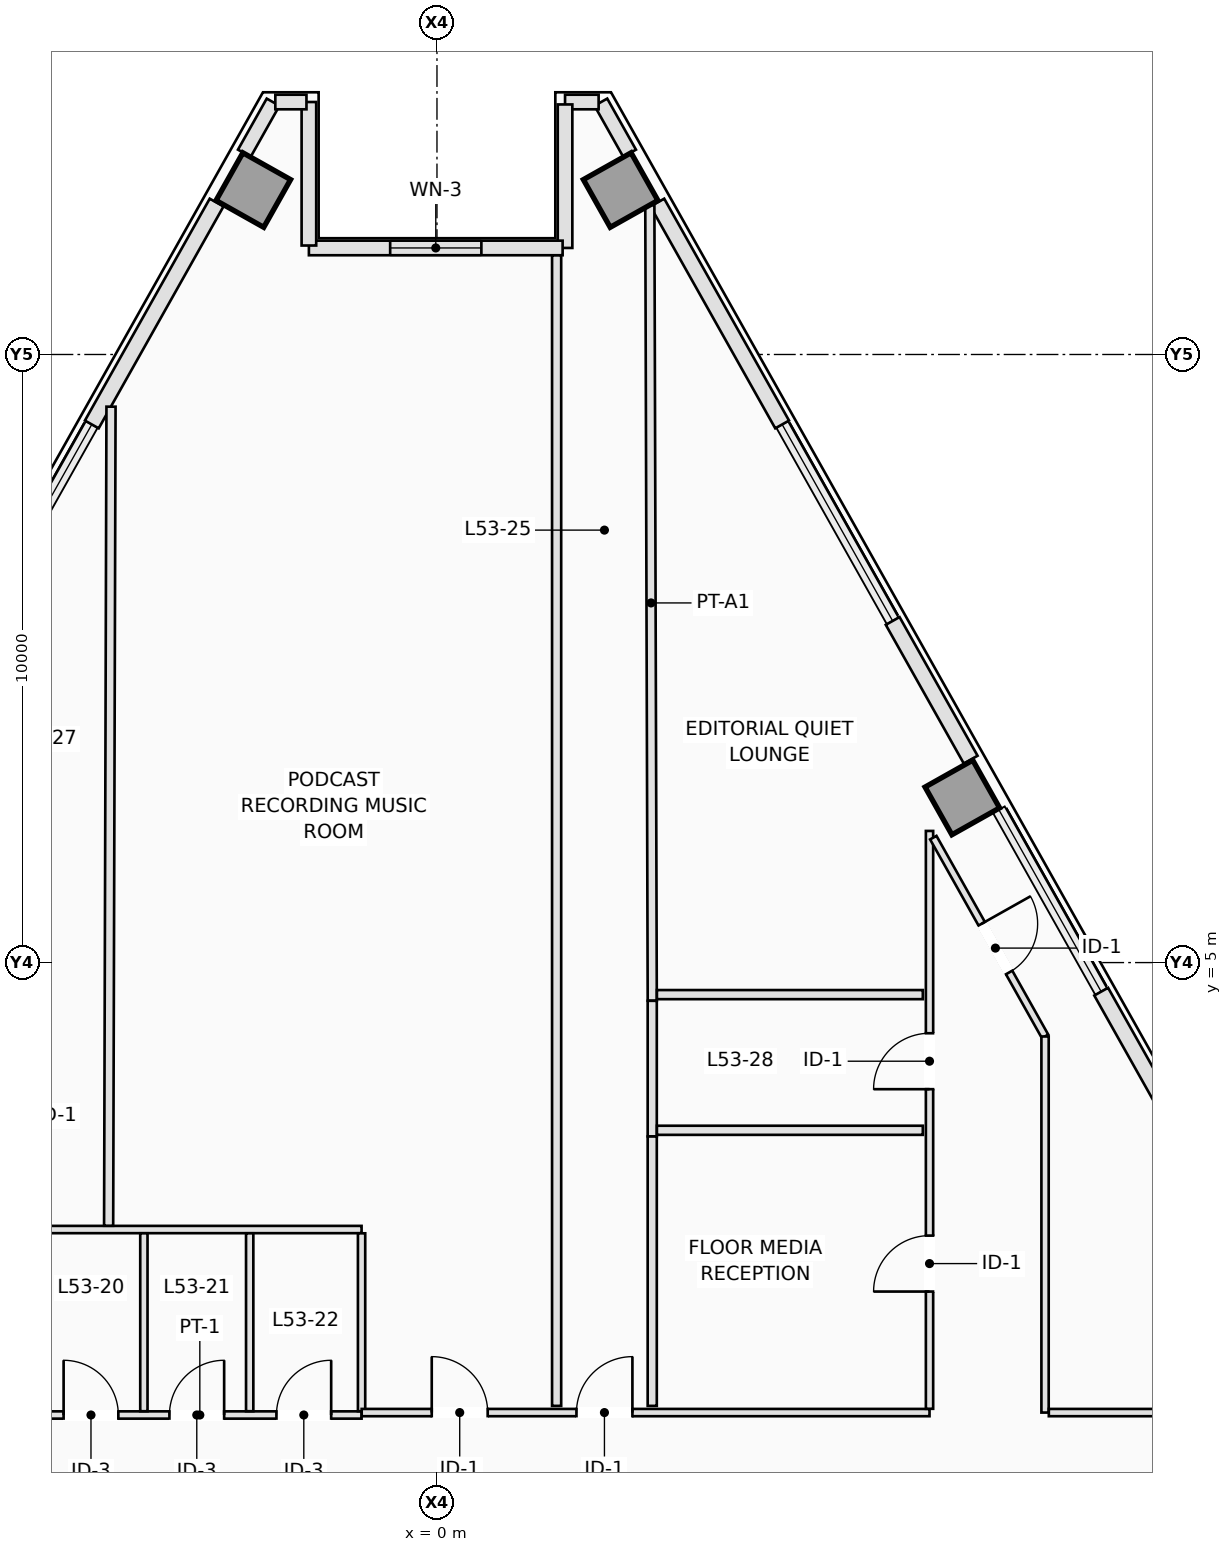
"""IFC4 building model, lengths in metres.
Left out: names, types, materials, properties, quantities, classifications, styles, units other than length and angle.
Written with IfcOpenShell. Run it as: python <this file> out.ifc"""

import sys

from ifc_helpers import new_model, si_unit, direction, frame, frame_2d, origin, origin_2d, place, context, subcontext, project, spatial, rectangle, extrude, element, fill, save


model = new_model("IFC4")
c1 = context("Model", 3, precision=1e-05, world=origin(), true_north=direction((0.0, 1.0)))
c2 = subcontext(c1, "Body", "Model", "MODEL_VIEW")
j1 = project(units=[si_unit("LENGTHUNIT", "METRE"), si_unit("PLANEANGLEUNIT", "RADIAN")], contexts=[c1])
p1 = place(None, origin())
s1 = spatial("IfcSite", under=j1, at=p1, CompositionType="ELEMENT")
p2 = place(p1, origin())
s2 = spatial("IfcBuilding", under=s1, at=p2, CompositionType="ELEMENT")
p3 = place(p2, frame((0.0, 0.0, 193.9)))
s3 = spatial("IfcBuildingStorey", under=s2, at=p3, CompositionType="ELEMENT", Elevation=193.9)
for number, where, z_axis, x_axis in (
    (1, (8.64, 7.715, 0.0), (0.0, 0.0, 1.0), (0.872, 0.49, 0.0)),
    (2, (3.021, 17.704, 0.0), (0.0, 0.0, 1.0), (0.872, 0.49, 0.0)),
    (3, (-3.021, 17.704, 0.0), (0.0, 0.0, 1.0), (-0.872, 0.49, 0.0)),
):
    element("IfcColumn", number, at=place(p3, frame(where, z_axis=z_axis, x_axis=x_axis)), inside=s3, PredefinedType="COLUMN", context=c2, shape_type="SweptSolid", body=[
        extrude(rectangle(XDim=0.9, YDim=0.9, at=origin_2d()), origin(), (0.0, 0.0, 1.0), 3.5),
    ])
p4 = place(p3, frame((2.695, 19.149, 0.0), z_axis=(0.0, 0.0, 1.0), x_axis=(0.490345412687, -0.87152818443, 0.0)))
e4 = element("IfcWall", 4, at=p4, inside=s3, PredefinedType="STANDARD", context=c2, shape_type="SweptSolid", body=[
    extrude(rectangle(XDim=0.964, YDim=0.24, at=frame_2d((0.482, 0.0))), origin(), (0.0, 0.0, 1.0), 3.25),
])
p5 = place(p3, frame((3.624, 17.499, 0.0), z_axis=(0.0, 0.0, 1.0), x_axis=(0.490275081837, -0.87156775074, 0.0)))
e5 = element("IfcWall", 5, at=p5, inside=s3, PredefinedType="STANDARD", context=c2, shape_type="SweptSolid", body=[
    extrude(rectangle(XDim=4.187, YDim=0.26, at=frame_2d((2.094, 0.0))), origin(), (0.0, 0.0, 1.0), 3.25),
])
p6 = place(p3, frame((7.494, 10.618, 0.0), z_axis=(0.0, 0.0, 1.0), x_axis=(0.490301099378, -0.871553114818, 0.0)))
e6 = element("IfcWall", 6, at=p6, inside=s3, PredefinedType="STANDARD", context=c2, shape_type="SweptSolid", body=[
    extrude(rectangle(XDim=2.617, YDim=0.26, at=frame_2d((1.309, 0.0))), origin(), (0.0, 0.0, 1.0), 3.25),
])
p7 = place(p3, frame((10.923, 4.522, 0.0), z_axis=(0.0, 0.0, 1.0), x_axis=(0.490264765862, -0.871573553611, 0.0)))
e7 = element("IfcWall", 7, at=p7, inside=s3, PredefinedType="STANDARD", context=c2, shape_type="SweptSolid", body=[
    extrude(rectangle(XDim=3.287, YDim=0.26, at=frame_2d((1.644, 0.0))), origin(), (0.0, 0.0, 1.0), 3.25),
])
p8 = place(p3, frame((-3.168, 18.309, 0.0), z_axis=(0.0, 0.0, 1.0), x_axis=(0.490345412687, 0.87152818443, 0.0)))
e8 = element("IfcWall", 8, at=p8, inside=s3, PredefinedType="STANDARD", context=c2, shape_type="SweptSolid", body=[
    extrude(rectangle(XDim=0.964, YDim=0.24, at=frame_2d((0.482, 0.0))), origin(), (0.0, 0.0, 1.0), 3.25),
])
p9 = place(p3, frame((-5.677, 13.85, 0.0), z_axis=(0.0, 0.0, 1.0), x_axis=(0.490275081837, 0.87156775074, 0.0)))
e9 = element("IfcWall", 9, at=p9, inside=s3, PredefinedType="STANDARD", context=c2, shape_type="SweptSolid", body=[
    extrude(rectangle(XDim=4.187, YDim=0.26, at=frame_2d((2.094, 0.0))), origin(), (0.0, 0.0, 1.0), 3.25),
])
p10 = place(p3, frame((2.658, 19.152, 0.0), z_axis=(0.0, 0.0, 1.0), x_axis=(-1.0, 0.0, 0.0)))
e10 = element("IfcWall", 10, at=p10, inside=s3, PredefinedType="STANDARD", context=c2, shape_type="SweptSolid", body=[
    extrude(rectangle(XDim=0.552, YDim=0.24, at=frame_2d((0.276, 0.0))), origin(), (0.0, 0.0, 1.0), 3.25),
])
p11 = place(p3, frame((2.106, 19.112, 0.0), z_axis=(0.0, 0.0, 1.0), x_axis=(0.0, -1.0, 0.0)))
e11 = element("IfcWall", 11, at=p11, inside=s3, PredefinedType="STANDARD", context=c2, shape_type="SweptSolid", body=[
    extrude(rectangle(XDim=2.36, YDim=0.24, at=frame_2d((1.18, 0.0))), origin(), (0.0, 0.0, 1.0), 3.25),
])
p12 = place(p3, frame((2.066, 16.752, 0.0), z_axis=(0.0, 0.0, 1.0), x_axis=(-1.0, 0.0, 0.0)))
e12 = element("IfcWall", 12, at=p12, inside=s3, PredefinedType="STANDARD", context=c2, shape_type="SweptSolid", body=[
    extrude(rectangle(XDim=4.172, YDim=0.24, at=frame_2d((2.086, 0.0))), origin(), (0.0, 0.0, 1.0), 3.25),
])
p13 = place(p12, frame((1.336, 0.0, 0.9)))
e13 = element("IfcOpeningElement", 13, at=p13, cuts=e12, PredefinedType="OPENING", context=c2, shape_type="SweptSolid", body=[
    extrude(rectangle(XDim=1.5, YDim=1.95, at=frame_2d((0.75, 0.975))), frame((0.0, 0.13, 0.0), z_axis=(0.0, -1.0, 0.0), x_axis=(1.0, 0.0, 0.0)), (0.0, 0.0, 1.0), 0.26),
])
p14 = place(p3, frame((-2.106, 16.792, 0.0), z_axis=(0.0, 0.0, 1.0), x_axis=(0.0, 1.0, 0.0)))
e14 = element("IfcWall", 14, at=p14, inside=s3, PredefinedType="STANDARD", context=c2, shape_type="SweptSolid", body=[
    extrude(rectangle(XDim=2.36, YDim=0.24, at=frame_2d((1.18, 0.0))), origin(), (0.0, 0.0, 1.0), 3.25),
])
p15 = place(p3, frame((-2.146, 19.152, 0.0), z_axis=(0.0, 0.0, 1.0), x_axis=(-1.0, 0.0, 0.0)))
e15 = element("IfcWall", 15, at=p15, inside=s3, PredefinedType="STANDARD", context=c2, shape_type="SweptSolid", body=[
    extrude(rectangle(XDim=0.512, YDim=0.24, at=frame_2d((0.256, 0.0))), origin(), (0.0, 0.0, 1.0), 3.25),
])
p16 = place(p3, frame((-6.56, -2.44, 0.0), z_axis=(0.0, 0.0, 1.0), x_axis=(1.0, 0.0, 0.0)))
e16 = element("IfcWall", 16, at=p16, inside=s3, PredefinedType="PARTITIONING", context=c2, shape_type="SweptSolid", body=[
    extrude(rectangle(XDim=5.32, YDim=0.12, at=frame_2d((2.66, 0.0))), origin(), (0.0, 0.0, 1.0), 2.943),
])
p17 = place(p16, frame((0.42, 0.0, 0.0)))
e17 = element("IfcOpeningElement", 17, at=p17, cuts=e16, PredefinedType="OPENING", context=c2, shape_type="SweptSolid", body=[
    extrude(rectangle(XDim=0.9, YDim=2.12, at=frame_2d((0.45, 1.06))), frame((0.0, 0.07, 0.0), z_axis=(0.0, -1.0, 0.0), x_axis=(1.0, 0.0, 0.0)), (0.0, 0.0, 1.0), 0.14),
])
p18 = place(p16, frame((2.16, 0.0, 0.0)))
e18 = element("IfcOpeningElement", 18, at=p18, cuts=e16, PredefinedType="OPENING", context=c2, shape_type="SweptSolid", body=[
    extrude(rectangle(XDim=0.9, YDim=2.12, at=frame_2d((0.45, 1.06))), frame((0.0, 0.07, 0.0), z_axis=(0.0, -1.0, 0.0), x_axis=(1.0, 0.0, 0.0)), (0.0, 0.0, 1.0), 0.14),
])
p19 = place(p16, frame((3.92, 0.0, 0.0)))
e19 = element("IfcOpeningElement", 19, at=p19, cuts=e16, PredefinedType="OPENING", context=c2, shape_type="SweptSolid", body=[
    extrude(rectangle(XDim=0.9, YDim=2.12, at=frame_2d((0.45, 1.06))), frame((0.0, 0.07, 0.0), z_axis=(0.0, -1.0, 0.0), x_axis=(1.0, 0.0, 0.0)), (0.0, 0.0, 1.0), 0.14),
])
p20 = place(p3, frame((-6.56, 0.61, 0.0), z_axis=(0.0, 0.0, 1.0), x_axis=(1.0, 0.0, 0.0)))
e20 = element("IfcWall", 20, at=p20, inside=s3, PredefinedType="PARTITIONING", context=c2, shape_type="SweptSolid", body=[
    extrude(rectangle(XDim=5.32, YDim=0.12, at=frame_2d((2.66, 0.0))), origin(), (0.0, 0.0, 1.0), 3.25),
])
for number, where, z_axis, x_axis in (
    (21, (-4.82, -2.378, 0.0), (0.0, 0.0, 1.0), (0.0, 1.0, 0.0)),
    (22, (-3.08, -2.378, 0.0), (0.0, 0.0, 1.0), (0.0, 1.0, 0.0)),
    (23, (-1.24, -2.378, 0.0), (0.0, 0.0, 1.0), (0.0, 1.0, 0.0)),
):
    element("IfcWall", number, at=place(p3, frame(where, z_axis=z_axis, x_axis=x_axis)), inside=s3, PredefinedType="PARTITIONING", context=c2, shape_type="SweptSolid", body=[
        extrude(rectangle(XDim=2.926, YDim=0.12, at=frame_2d((1.463, 0.0))), origin(), (0.0, 0.0, 1.0), 3.25),
    ])
p21 = place(p3, frame((-1.238, -2.4, 0.0), z_axis=(0.0, 0.0, 1.0), x_axis=(1.0, 0.0, 0.0)))
e24 = element("IfcWall", 24, at=p21, inside=s3, PredefinedType="PARTITIONING", context=c2, shape_type="SweptSolid", body=[
    extrude(rectangle(XDim=9.338, YDim=0.12, at=frame_2d((4.669, 0.0))), origin(), (0.0, 0.0, 1.0), 2.943),
])
p22 = place(p21, frame((3.532, 0.0, 0.0)))
e25 = element("IfcOpeningElement", 25, at=p22, cuts=e24, PredefinedType="OPENING", context=c2, shape_type="SweptSolid", body=[
    extrude(rectangle(XDim=0.92, YDim=2.12, at=frame_2d((0.46, 1.06))), frame((0.0, 0.07, 0.0), z_axis=(0.0, -1.0, 0.0), x_axis=(1.0, 0.0, 0.0)), (0.0, 0.0, 1.0), 0.14),
])
p23 = place(p21, frame((1.152, 0.0, 0.0)))
e26 = element("IfcOpeningElement", 26, at=p23, cuts=e24, PredefinedType="OPENING", context=c2, shape_type="SweptSolid", body=[
    extrude(rectangle(XDim=0.92, YDim=2.12, at=frame_2d((0.46, 1.06))), frame((0.0, 0.07, 0.0), z_axis=(0.0, -1.0, 0.0), x_axis=(1.0, 0.0, 0.0)), (0.0, 0.0, 1.0), 0.14),
])
p24 = place(p3, frame((8.1, -2.338, 0.0), z_axis=(0.0, 0.0, 1.0), x_axis=(0.0, 1.0, 0.0)))
e27 = element("IfcWall", 27, at=p24, inside=s3, PredefinedType="PARTITIONING", context=c2, shape_type="SweptSolid", body=[
    extrude(rectangle(XDim=9.503, YDim=0.12, at=frame_2d((4.751, 0.0))), origin(), (0.0, 0.0, 1.0), 3.25),
])
p25 = place(p24, frame((5.256, 0.0, 0.0)))
e28 = element("IfcOpeningElement", 28, at=p25, cuts=e27, PredefinedType="OPENING", context=c2, shape_type="SweptSolid", body=[
    extrude(rectangle(XDim=0.92, YDim=2.12, at=frame_2d((0.46, 1.06))), frame((0.0, 0.07, 0.0), z_axis=(0.0, -1.0, 0.0), x_axis=(1.0, 0.0, 0.0)), (0.0, 0.0, 1.0), 0.14),
])
p26 = place(p24, frame((1.928, 0.0, 0.0)))
e29 = element("IfcOpeningElement", 29, at=p26, cuts=e27, PredefinedType="OPENING", context=c2, shape_type="SweptSolid", body=[
    extrude(rectangle(XDim=0.92, YDim=2.12, at=frame_2d((0.46, 1.06))), frame((0.0, 0.07, 0.0), z_axis=(0.0, -1.0, 0.0), x_axis=(1.0, 0.0, 0.0)), (0.0, 0.0, 1.0), 0.14),
])
p27 = place(p3, frame((8.162, 7.055, 0.0), z_axis=(0.0, 0.0, 1.0), x_axis=(0.490236504766, -0.871589450025, 0.0)))
e30 = element("IfcWall", 30, at=p27, inside=s3, PredefinedType="PARTITIONING", context=c2, shape_type="SweptSolid", body=[
    extrude(rectangle(XDim=3.749, YDim=0.12, at=frame_2d((1.875, 0.0))), origin(), (0.0, 0.0, 1.0), 3.25),
])
p28 = place(p27, frame((1.624, 0.0, 0.0)))
e31 = element("IfcOpeningElement", 31, at=p28, cuts=e30, PredefinedType="OPENING", context=c2, shape_type="SweptSolid", body=[
    extrude(rectangle(XDim=0.92, YDim=2.12, at=frame_2d((0.46, 1.06))), frame((0.0, 0.07, 0.0), z_axis=(0.0, -1.0, 0.0), x_axis=(1.0, 0.0, 0.0)), (0.0, 0.0, 1.0), 0.14),
])
p29 = place(p3, frame((10.0, 3.785, 0.0), z_axis=(0.0, 0.0, 1.0), x_axis=(0.0, -1.0, 0.0)))
e32 = element("IfcWall", 32, at=p29, inside=s3, PredefinedType="PARTITIONING", context=c2, shape_type="SweptSolid", body=[
    extrude(rectangle(XDim=6.185, YDim=0.12, at=frame_2d((3.092, 0.0))), origin(), (0.0, 0.0, 1.0), 3.25),
])
p30 = place(p3, frame((10.062, -2.4, 0.0), z_axis=(0.0, 0.0, 1.0), x_axis=(1.0, 0.0, 0.0)))
e33 = element("IfcWall", 33, at=p30, inside=s3, PredefinedType="PARTITIONING", context=c2, shape_type="SweptSolid", body=[
    extrude(rectangle(XDim=2.348, YDim=0.12, at=frame_2d((1.174, 0.0))), origin(), (0.0, 0.0, 1.0), 3.25),
])
p31 = place(p3, frame((3.54, 4.373, 0.0), z_axis=(0.0, 0.0, 1.0), x_axis=(-0.003041825214, 0.999995373639, 0.0)))
e34 = element("IfcWall", 34, at=p31, inside=s3, PredefinedType="PARTITIONING", context=c2, shape_type="SweptSolid", body=[
    extrude(rectangle(XDim=13.083, YDim=0.15, at=frame_2d((6.541, 0.0))), origin(), (0.0, 0.0, 1.0), 2.722),
])
p32 = place(p3, frame((7.99, 4.473, 0.0), z_axis=(0.0, 0.0, 1.0), x_axis=(-1.0, 0.0, 0.0)))
e35 = element("IfcWall", 35, at=p32, inside=s3, PredefinedType="PARTITIONING", context=c2, shape_type="SweptSolid", body=[
    extrude(rectangle(XDim=4.373, YDim=0.15, at=frame_2d((2.187, 0.0))), origin(), (0.0, 0.0, 1.0), 3.25),
])
p33 = place(p3, frame((1.968, -2.29, 0.0), z_axis=(0.0, 0.0, 1.0), x_axis=(0.0, 1.0, 0.0)))
e36 = element("IfcWall", 36, at=p33, inside=s3, PredefinedType="PARTITIONING", context=c2, shape_type="SweptSolid", body=[
    extrude(rectangle(XDim=18.92, YDim=0.15, at=frame_2d((9.46, 0.0))), origin(), (0.0, 0.0, 1.0), 3.25),
])
p34 = place(p3, frame((3.54, 4.371, 0.0), z_axis=(0.0, 0.0, 1.0), x_axis=(0.0, -1.0, 0.0)))
e37 = element("IfcWall", 37, at=p34, inside=s3, PredefinedType="PARTITIONING", context=c2, shape_type="SweptSolid", body=[
    extrude(rectangle(XDim=2.229, YDim=0.15, at=frame_2d((1.115, 0.0))), origin(), (0.0, 0.0, 1.0), 2.722),
])
p35 = place(p3, frame((3.54, 2.14, 0.0), z_axis=(0.0, 0.0, 1.0), x_axis=(0.0, -1.0, 0.0)))
e38 = element("IfcWall", 38, at=p35, inside=s3, PredefinedType="PARTITIONING", context=c2, shape_type="SweptSolid", body=[
    extrude(rectangle(XDim=4.43, YDim=0.15, at=frame_2d((2.215, 0.0))), origin(), (0.0, 0.0, 1.0), 2.722),
])
p36 = place(p3, frame((-5.4, 0.672, 0.0), z_axis=(0.0, 0.0, 1.0), x_axis=(0.002918134461, 0.999995742237, 0.0)))
e39 = element("IfcWall", 39, at=p36, inside=s3, PredefinedType="PARTITIONING", context=c2, shape_type="SweptSolid", body=[
    extrude(rectangle(XDim=13.47, YDim=0.15, at=frame_2d((6.735, 0.0))), origin(), (0.0, 0.0, 1.0), 3.25),
])
p37 = place(p3, frame((7.99, 2.242, 0.0), z_axis=(0.0, 0.0, 1.0), x_axis=(-1.0, 0.0, 0.0)))
e40 = element("IfcWall", 40, at=p37, inside=s3, PredefinedType="PARTITIONING", context=c2, shape_type="SweptSolid", body=[
    extrude(rectangle(XDim=4.373, YDim=0.15, at=frame_2d((2.187, 0.0))), origin(), (0.0, 0.0, 1.0), 3.25),
])
p38 = place(p13, origin())
e41 = element("IfcWindow", 41, at=p38, inside=s3, PartitioningType="SINGLE_PANEL", PredefinedType="WINDOW", context=c2, shape_type="SweptSolid", body=[
    extrude(rectangle(XDim=1.5, YDim=1.95, at=frame_2d((0.75, 0.975))), frame((0.0, 0.03, 0.0), z_axis=(0.0, -1.0, 0.0), x_axis=(1.0, 0.0, 0.0)), (0.0, 0.0, 1.0), 0.06),
])
fill(e13, e41)
p39 = place(p17, origin())
e42 = element("IfcDoor", 42, at=p39, inside=s3, OperationType="SINGLE_SWING_LEFT", PredefinedType="DOOR", context=c2, shape_type="SweptSolid", body=[
    extrude(rectangle(XDim=0.9, YDim=2.12, at=frame_2d((0.45, 1.06))), frame((0.0, 0.025, 0.0), z_axis=(0.0, -1.0, 0.0), x_axis=(1.0, 0.0, 0.0)), (0.0, 0.0, 1.0), 0.05),
])
fill(e17, e42)
p40 = place(p18, origin())
e43 = element("IfcDoor", 43, at=p40, inside=s3, OperationType="SINGLE_SWING_RIGHT", PredefinedType="DOOR", context=c2, shape_type="SweptSolid", body=[
    extrude(rectangle(XDim=0.9, YDim=2.12, at=frame_2d((0.45, 1.06))), frame((0.0, 0.025, 0.0), z_axis=(0.0, -1.0, 0.0), x_axis=(1.0, 0.0, 0.0)), (0.0, 0.0, 1.0), 0.05),
])
fill(e18, e43)
p41 = place(p19, origin())
e44 = element("IfcDoor", 44, at=p41, inside=s3, OperationType="SINGLE_SWING_RIGHT", PredefinedType="DOOR", context=c2, shape_type="SweptSolid", body=[
    extrude(rectangle(XDim=0.9, YDim=2.12, at=frame_2d((0.45, 1.06))), frame((0.0, 0.025, 0.0), z_axis=(0.0, -1.0, 0.0), x_axis=(1.0, 0.0, 0.0)), (0.0, 0.0, 1.0), 0.05),
])
fill(e19, e44)
p42 = place(p28, origin())
e45 = element("IfcDoor", 45, at=p42, inside=s3, OperationType="SINGLE_SWING_LEFT", PredefinedType="DOOR", context=c2, shape_type="SweptSolid", body=[
    extrude(rectangle(XDim=0.92, YDim=2.12, at=frame_2d((0.46, 1.06))), frame((0.0, 0.025, 0.0), z_axis=(0.0, -1.0, 0.0), x_axis=(1.0, 0.0, 0.0)), (0.0, 0.0, 1.0), 0.05),
])
fill(e31, e45)
p43 = place(p22, origin())
e46 = element("IfcDoor", 46, at=p43, inside=s3, OperationType="SINGLE_SWING_RIGHT", PredefinedType="DOOR", context=c2, shape_type="SweptSolid", body=[
    extrude(rectangle(XDim=0.92, YDim=2.12, at=frame_2d((0.46, 1.06))), frame((0.0, 0.025, 0.0), z_axis=(0.0, -1.0, 0.0), x_axis=(1.0, 0.0, 0.0)), (0.0, 0.0, 1.0), 0.05),
])
fill(e25, e46)
p44 = place(p23, origin())
e47 = element("IfcDoor", 47, at=p44, inside=s3, OperationType="SINGLE_SWING_LEFT", PredefinedType="DOOR", context=c2, shape_type="SweptSolid", body=[
    extrude(rectangle(XDim=0.92, YDim=2.12, at=frame_2d((0.46, 1.06))), frame((0.0, 0.025, 0.0), z_axis=(0.0, -1.0, 0.0), x_axis=(1.0, 0.0, 0.0)), (0.0, 0.0, 1.0), 0.05),
])
fill(e26, e47)
p45 = place(p25, origin())
e48 = element("IfcDoor", 48, at=p45, inside=s3, OperationType="SINGLE_SWING_LEFT", PredefinedType="DOOR", context=c2, shape_type="SweptSolid", body=[
    extrude(rectangle(XDim=0.92, YDim=2.12, at=frame_2d((0.46, 1.06))), frame((0.0, 0.025, 0.0), z_axis=(0.0, -1.0, 0.0), x_axis=(1.0, 0.0, 0.0)), (0.0, 0.0, 1.0), 0.05),
])
fill(e28, e48)
p46 = place(p26, origin())
e49 = element("IfcDoor", 49, at=p46, inside=s3, OperationType="SINGLE_SWING_LEFT", PredefinedType="DOOR", context=c2, shape_type="SweptSolid", body=[
    extrude(rectangle(XDim=0.92, YDim=2.12, at=frame_2d((0.46, 1.06))), frame((0.0, 0.025, 0.0), z_axis=(0.0, -1.0, 0.0), x_axis=(1.0, 0.0, 0.0)), (0.0, 0.0, 1.0), 0.05),
])
fill(e29, e49)
save(model, sys.argv[1])
